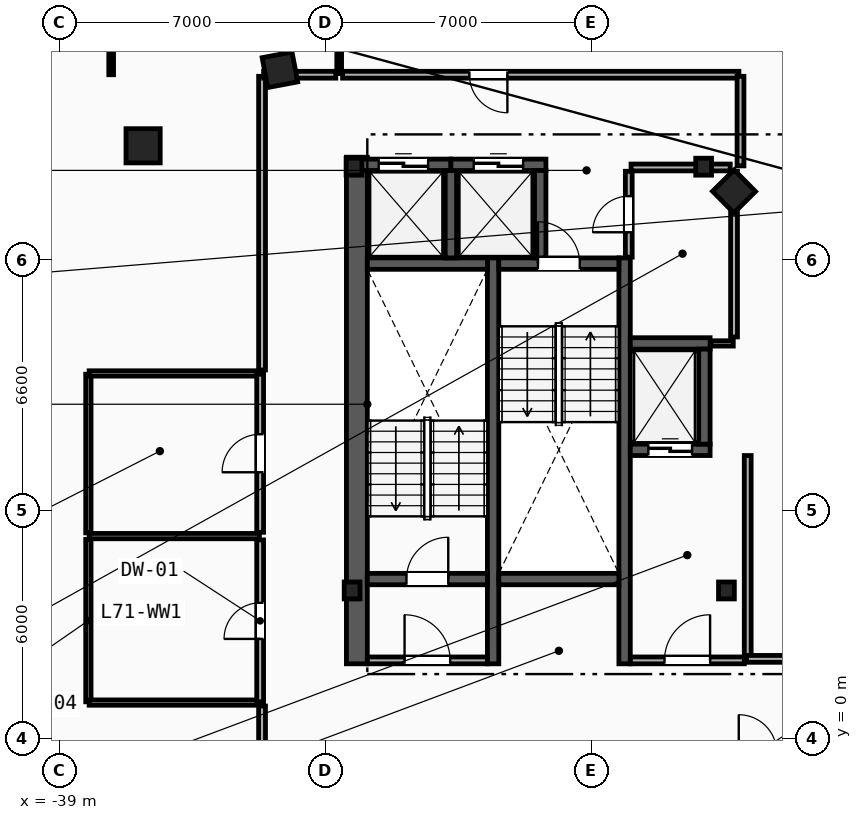
"""IFC4 building model, lengths in metres.
Left out: names, types, materials, properties, quantities, classifications, styles, units other than length and angle.
Written with IfcOpenShell. Run it as: python <this file> out.ifc"""

import sys

from ifc_helpers import new_model, si_unit, direction, frame, frame_2d, origin, origin_2d, place, context, subcontext, project, spatial, rectangle, i_section, extrude, element, fill, save


model = new_model("IFC4")
c1 = context("Model", 3, precision=1e-05, world=origin(), true_north=direction((0.0, 1.0)))
c2 = subcontext(c1, "Body", "Model", "MODEL_VIEW")
j1 = project(units=[si_unit("LENGTHUNIT", "METRE"), si_unit("PLANEANGLEUNIT", "RADIAN")], contexts=[c1])
p1 = place(None, origin())
s1 = spatial("IfcSite", under=j1, at=p1, CompositionType="ELEMENT")
p2 = place(p1, origin())
s2 = spatial("IfcBuilding", under=s1, at=p2, CompositionType="ELEMENT")
p3 = place(p2, frame((0.0, 0.0, 268.4)))
s3 = spatial("IfcBuildingStorey", under=s2, at=p3, CompositionType="ELEMENT", Elevation=268.4)
for number, where, z_axis, x_axis in (
    (1, (-31.3, 3.9, 0.0), (0.0, 0.0, 1.0), (1.0, 0.0, 0.0)),
    (2, (-21.45, 3.9, 0.0), (0.0, 0.0, 1.0), (1.0, 0.0, 0.0)),
    (3, (-22.05, 15.05, 0.0), (0.0, 0.0, 1.0), (1.0, 0.0, 0.0)),
    (4, (-31.25, 15.05, 0.0), (0.0, 0.0, 1.0), (1.0, 0.0, 0.0)),
):
    element("IfcColumn", number, at=place(p3, frame(where, z_axis=z_axis, x_axis=x_axis)), inside=s3, PredefinedType="COLUMN", context=c2, shape_type="SweptSolid", body=[
        extrude(i_section(OverallWidth=0.416, OverallDepth=0.446, WebThickness=0.039, FlangeThickness=0.063, FilletRadius=0.018, at=origin_2d()), origin(), (0.0, 0.0, 1.0), 3.6),
    ])
p4 = place(p3, frame((-36.8, 15.6, 0.0), z_axis=(0.0, 0.0, 1.0), x_axis=(1.0, 0.0, 0.0)))
e5 = element("IfcColumn", 5, at=p4, inside=s3, PredefinedType="COLUMN", context=c2, shape_type="SweptSolid", body=[
    extrude(rectangle(XDim=0.9, YDim=0.9, at=origin_2d()), origin(), (0.0, 0.0, 1.0), 3.6),
])
for number, where, z_axis, x_axis in (
    (6, (-21.25, 14.4, 0.0), (0.0, 0.0, 1.0), (-0.703, 0.711, 0.0)),
    (7, (-33.2, 17.6, 0.0), (0.0, 0.0, 1.0), (-0.983, -0.186, 0.0)),
):
    element("IfcColumn", number, at=place(p3, frame(where, z_axis=z_axis, x_axis=x_axis)), inside=s3, PredefinedType="COLUMN", context=c2, shape_type="SweptSolid", body=[
        extrude(rectangle(XDim=0.8, YDim=0.8, at=origin_2d()), origin(), (0.0, 0.0, 1.0), 3.6),
    ])
p5 = place(p3, frame((-31.175, 1.97, 0.0), z_axis=(0.0, 0.0, 1.0), x_axis=(0.0, 1.0, 0.0)))
e8 = element("IfcWall", 8, at=p5, inside=s3, PredefinedType="SHEAR", context=c2, shape_type="SweptSolid", body=[
    extrude(rectangle(XDim=13.33, YDim=0.55, at=frame_2d((6.665, 0.0))), origin(), (0.0, 0.0, 1.0), 3.34),
])
for number, where, z_axis, x_axis in (
    (9, (-27.59, 1.97, 0.0), (0.0, 0.0, 1.0), (0.0, 1.0, 0.0)),
    (10, (-24.13, 1.97, 0.0), (0.0, 0.0, 1.0), (0.0, 1.0, 0.0)),
):
    element("IfcWall", number, at=place(p3, frame(where, z_axis=z_axis, x_axis=x_axis)), inside=s3, PredefinedType="SHEAR", context=c2, shape_type="SweptSolid", body=[
        extrude(rectangle(XDim=10.68, YDim=0.3, at=frame_2d((5.34, 0.0))), origin(), (0.0, 0.0, 1.0), 3.34),
    ])
p6 = place(p3, frame((-30.9, 4.2, 0.0), z_axis=(0.0, 0.0, 1.0), x_axis=(1.0, 0.0, 0.0)))
e11 = element("IfcWall", 11, at=p6, inside=s3, PredefinedType="SHEAR", context=c2, shape_type="SweptSolid", body=[
    extrude(rectangle(XDim=3.16, YDim=0.3, at=frame_2d((1.58, 0.0))), origin(), (0.0, 0.0, 1.0), 3.34),
])
p7 = place(p6, frame((1.03, 0.0, 0.0)))
e12 = element("IfcOpeningElement", 12, at=p7, cuts=e11, PredefinedType="OPENING", context=c2, shape_type="SweptSolid", body=[
    extrude(rectangle(XDim=1.1, YDim=2.15, at=frame_2d((0.55, 1.075))), frame((0.0, 0.16, 0.0), z_axis=(0.0, -1.0, 0.0), x_axis=(1.0, 0.0, 0.0)), (0.0, 0.0, 1.0), 0.32),
])
p8 = place(p3, frame((-30.9, 12.5, 0.0), z_axis=(0.0, 0.0, 1.0), x_axis=(1.0, 0.0, 0.0)))
e13 = element("IfcWall", 13, at=p8, inside=s3, PredefinedType="SHEAR", context=c2, shape_type="SweptSolid", body=[
    extrude(rectangle(XDim=3.16, YDim=0.3, at=frame_2d((1.58, 0.0))), origin(), (0.0, 0.0, 1.0), 3.34),
])
p9 = place(p3, frame((-27.44, 12.5, 0.0), z_axis=(0.0, 0.0, 1.0), x_axis=(1.0, 0.0, 0.0)))
e14 = element("IfcWall", 14, at=p9, inside=s3, PredefinedType="SHEAR", context=c2, shape_type="SweptSolid", body=[
    extrude(rectangle(XDim=3.16, YDim=0.3, at=frame_2d((1.58, 0.0))), origin(), (0.0, 0.0, 1.0), 3.34),
])
p10 = place(p9, frame((1.03, 0.0, 0.0)))
e15 = element("IfcOpeningElement", 15, at=p10, cuts=e14, PredefinedType="OPENING", context=c2, shape_type="SweptSolid", body=[
    extrude(rectangle(XDim=1.1, YDim=2.15, at=frame_2d((0.55, 1.075))), frame((0.0, 0.16, 0.0), z_axis=(0.0, -1.0, 0.0), x_axis=(1.0, 0.0, 0.0)), (0.0, 0.0, 1.0), 0.32),
])
p11 = place(p3, frame((-27.44, 4.2, 0.0), z_axis=(0.0, 0.0, 1.0), x_axis=(1.0, 0.0, 0.0)))
e16 = element("IfcWall", 16, at=p11, inside=s3, PredefinedType="SHEAR", context=c2, shape_type="SweptSolid", body=[
    extrude(rectangle(XDim=3.16, YDim=0.3, at=frame_2d((1.58, 0.0))), origin(), (0.0, 0.0, 1.0), 3.34),
])
p12 = place(p3, frame((-20.89, 2.15, 0.0), z_axis=(0.0, 0.0, 1.0), x_axis=(0.0, 1.0, 0.0)))
e17 = element("IfcWall", 17, at=p12, inside=s3, PredefinedType="PARTITIONING", context=c2, shape_type="SweptSolid", body=[
    extrude(rectangle(XDim=5.3, YDim=0.18, at=frame_2d((2.65, 0.0))), origin(), (0.0, 0.0, 1.0), 3.34),
])
p13 = place(p3, frame((-23.98, 2.06, 0.0), z_axis=(0.0, 0.0, 1.0), x_axis=(1.0, 0.0, 0.0)))
e18 = element("IfcWall", 18, at=p13, inside=s3, PredefinedType="PARTITIONING", context=c2, shape_type="SweptSolid", body=[
    extrude(rectangle(XDim=3.0, YDim=0.18, at=frame_2d((1.5, 0.0))), origin(), (0.0, 0.0, 1.0), 3.34),
])
p14 = place(p13, frame((0.9, 0.0, 0.0)))
e19 = element("IfcOpeningElement", 19, at=p14, cuts=e18, PredefinedType="OPENING", context=c2, shape_type="SweptSolid", body=[
    extrude(rectangle(XDim=1.2, YDim=2.15, at=frame_2d((0.6, 1.075))), frame((0.0, 0.1, 0.0), z_axis=(0.0, -1.0, 0.0), x_axis=(1.0, 0.0, 0.0)), (0.0, 0.0, 1.0), 0.2),
])
p15 = place(p3, frame((-30.9, 2.06, 0.0), z_axis=(0.0, 0.0, 1.0), x_axis=(1.0, 0.0, 0.0)))
e20 = element("IfcWall", 20, at=p15, inside=s3, PredefinedType="PARTITIONING", context=c2, shape_type="SweptSolid", body=[
    extrude(rectangle(XDim=3.16, YDim=0.18, at=frame_2d((1.58, 0.0))), origin(), (0.0, 0.0, 1.0), 3.34),
])
p16 = place(p15, frame((0.98, 0.0, 0.0)))
e21 = element("IfcOpeningElement", 21, at=p16, cuts=e20, PredefinedType="OPENING", context=c2, shape_type="SweptSolid", body=[
    extrude(rectangle(XDim=1.2, YDim=2.15, at=frame_2d((0.6, 1.075))), frame((0.0, 0.1, 0.0), z_axis=(0.0, -1.0, 0.0), x_axis=(1.0, 0.0, 0.0)), (0.0, 0.0, 1.0), 0.2),
])
p17 = place(p3, frame((-23.98, 7.6, 0.0), z_axis=(0.0, 0.0, 1.0), x_axis=(1.0, 0.0, 0.0)))
e22 = element("IfcWall", 22, at=p17, inside=s3, PredefinedType="SHEAR", context=c2, shape_type="SweptSolid", body=[
    extrude(rectangle(XDim=2.1, YDim=0.3, at=frame_2d((1.05, 0.0))), origin(), (0.0, 0.0, 1.0), 3.34),
])
p18 = place(p17, frame((0.475, 0.0, 0.0)))
e23 = element("IfcOpeningElement", 23, at=p18, cuts=e22, PredefinedType="OPENING", context=c2, shape_type="SweptSolid", body=[
    extrude(rectangle(XDim=1.15, YDim=2.2, at=frame_2d((0.575, 1.1))), frame((0.0, 0.16, 0.0), z_axis=(0.0, -1.0, 0.0), x_axis=(1.0, 0.0, 0.0)), (0.0, 0.0, 1.0), 0.32),
])
p19 = place(p3, frame((-23.98, 10.4, 0.0), z_axis=(0.0, 0.0, 1.0), x_axis=(1.0, 0.0, 0.0)))
e24 = element("IfcWall", 24, at=p19, inside=s3, PredefinedType="SHEAR", context=c2, shape_type="SweptSolid", body=[
    extrude(rectangle(XDim=2.1, YDim=0.3, at=frame_2d((1.05, 0.0))), origin(), (0.0, 0.0, 1.0), 3.34),
])
p20 = place(p3, frame((-22.03, 7.75, 0.0), z_axis=(0.0, 0.0, 1.0), x_axis=(0.0, 1.0, 0.0)))
e25 = element("IfcWall", 25, at=p20, inside=s3, PredefinedType="SHEAR", context=c2, shape_type="SweptSolid", body=[
    extrude(rectangle(XDim=2.5, YDim=0.3, at=frame_2d((1.25, 0.0))), origin(), (0.0, 0.0, 1.0), 3.34),
])
p21 = place(p3, frame((-31.2, 15.1, 0.0), z_axis=(0.0, 0.0, 1.0), x_axis=(1.0, 0.0, 0.0)))
e26 = element("IfcWall", 26, at=p21, inside=s3, PredefinedType="SHEAR", context=c2, shape_type="SweptSolid", body=[
    extrude(rectangle(XDim=2.5, YDim=0.3, at=frame_2d((1.25, 0.0))), origin(), (0.0, 0.0, 1.0), 3.34),
])
p22 = place(p21, frame((0.6, 0.0, 0.0)))
e27 = element("IfcOpeningElement", 27, at=p22, cuts=e26, PredefinedType="OPENING", context=c2, shape_type="SweptSolid", body=[
    extrude(rectangle(XDim=1.3, YDim=2.2, at=frame_2d((0.65, 1.1))), frame((0.0, 0.16, 0.0), z_axis=(0.0, -1.0, 0.0), x_axis=(1.0, 0.0, 0.0)), (0.0, 0.0, 1.0), 0.32),
])
p23 = place(p3, frame((-28.7, 12.65, 0.0), z_axis=(0.0, 0.0, 1.0), x_axis=(0.0, 1.0, 0.0)))
e28 = element("IfcWall", 28, at=p23, inside=s3, PredefinedType="SHEAR", context=c2, shape_type="SweptSolid", body=[
    extrude(rectangle(XDim=2.3, YDim=0.3, at=frame_2d((1.15, 0.0))), origin(), (0.0, 0.0, 1.0), 3.34),
])
p24 = place(p3, frame((-28.7, 15.1, 0.0), z_axis=(0.0, 0.0, 1.0), x_axis=(1.0, 0.0, 0.0)))
e29 = element("IfcWall", 29, at=p24, inside=s3, PredefinedType="SHEAR", context=c2, shape_type="SweptSolid", body=[
    extrude(rectangle(XDim=2.5, YDim=0.3, at=frame_2d((1.25, 0.0))), origin(), (0.0, 0.0, 1.0), 3.34),
])
p25 = place(p24, frame((0.6, 0.0, 0.0)))
e30 = element("IfcOpeningElement", 30, at=p25, cuts=e29, PredefinedType="OPENING", context=c2, shape_type="SweptSolid", body=[
    extrude(rectangle(XDim=1.3, YDim=2.2, at=frame_2d((0.65, 1.1))), frame((0.0, 0.16, 0.0), z_axis=(0.0, -1.0, 0.0), x_axis=(1.0, 0.0, 0.0)), (0.0, 0.0, 1.0), 0.32),
])
p26 = place(p3, frame((-26.35, 12.65, 0.0), z_axis=(0.0, 0.0, 1.0), x_axis=(0.0, 1.0, 0.0)))
e31 = element("IfcWall", 31, at=p26, inside=s3, PredefinedType="SHEAR", context=c2, shape_type="SweptSolid", body=[
    extrude(rectangle(XDim=2.3, YDim=0.3, at=frame_2d((1.15, 0.0))), origin(), (0.0, 0.0, 1.0), 3.34),
])
p27 = place(p3, frame((-21.86, 10.4, 0.0), z_axis=(0.0, 0.0, 1.0), x_axis=(1.0, 0.0, 0.0)))
e32 = element("IfcWall", 32, at=p27, inside=s3, PredefinedType="PARTITIONING", context=c2, shape_type="SweptSolid", body=[
    extrude(rectangle(XDim=0.59, YDim=0.14, at=frame_2d((0.295, 0.0))), origin(), (0.0, 0.0, 1.0), 3.34),
])
p28 = place(p3, frame((-21.25, 10.57, 0.0), z_axis=(0.0, 0.0, 1.0), x_axis=(0.0, 1.0, 0.0)))
e33 = element("IfcWall", 33, at=p28, inside=s3, PredefinedType="PARTITIONING", context=c2, shape_type="SweptSolid", body=[
    extrude(rectangle(XDim=4.36, YDim=0.18, at=frame_2d((2.18, 0.0))), origin(), (0.0, 0.0, 1.0), 3.34),
])
p29 = place(p3, frame((-23.96, 15.03, 0.0), z_axis=(0.0, 0.0, 1.0), x_axis=(1.0, 0.0, 0.0)))
e34 = element("IfcWall", 34, at=p29, inside=s3, PredefinedType="PARTITIONING", context=c2, shape_type="SweptSolid", body=[
    extrude(rectangle(XDim=2.61, YDim=0.18, at=frame_2d((1.305, 0.0))), origin(), (0.0, 0.0, 1.0), 2.413),
])
p30 = place(p3, frame((-24.02, 12.67, 0.0), z_axis=(0.0, 0.0, 1.0), x_axis=(0.0, 1.0, 0.0)))
e35 = element("IfcWall", 35, at=p30, inside=s3, PredefinedType="PARTITIONING", context=c2, shape_type="SweptSolid", body=[
    extrude(rectangle(XDim=2.26, YDim=0.18, at=frame_2d((1.13, 0.0))), origin(), (0.0, 0.0, 1.0), 3.34),
])
p31 = place(p30, frame((0.655, 0.0, 0.0)))
e36 = element("IfcOpeningElement", 36, at=p31, cuts=e35, PredefinedType="OPENING", context=c2, shape_type="SweptSolid", body=[
    extrude(rectangle(XDim=0.95, YDim=2.1, at=frame_2d((0.475, 1.05))), frame((0.0, 0.1, 0.0), z_axis=(0.0, -1.0, 0.0), x_axis=(1.0, 0.0, 0.0)), (0.0, 0.0, 1.0), 0.2),
])
p32 = place(p3, frame((-38.24, 0.97, 0.0), z_axis=(0.0, 0.0, 1.0), x_axis=(0.0, 1.0, 0.0)))
e37 = element("IfcWall", 37, at=p32, inside=s3, PredefinedType="PARTITIONING", context=c2, shape_type="SweptSolid", body=[
    extrude(rectangle(XDim=4.275, YDim=0.14, at=frame_2d((2.138, 0.0))), origin(), (0.0, 0.0, 1.0), 3.34),
])
p33 = place(p3, frame((-38.24, 5.415, 0.0), z_axis=(0.0, 0.0, 1.0), x_axis=(0.0, 1.0, 0.0)))
e38 = element("IfcWall", 38, at=p33, inside=s3, PredefinedType="PARTITIONING", context=c2, shape_type="SweptSolid", body=[
    extrude(rectangle(XDim=4.175, YDim=0.14, at=frame_2d((2.087, 0.0))), origin(), (0.0, 0.0, 1.0), 3.34),
])
for number, where, z_axis, x_axis in (
    (39, (-38.22, 0.95, 0.0), (0.0, 0.0, 1.0), (1.0, 0.0, 0.0)),
    (40, (-38.22, 5.33, 0.0), (0.0, 0.0, 1.0), (1.0, 0.0, 0.0)),
    (41, (-38.22, 9.61, 0.0), (0.0, 0.0, 1.0), (1.0, 0.0, 0.0)),
):
    element("IfcWall", number, at=place(p3, frame(where, z_axis=z_axis, x_axis=x_axis)), inside=s3, PredefinedType="PARTITIONING", context=c2, shape_type="SweptSolid", body=[
        extrude(rectangle(XDim=4.48, YDim=0.14, at=frame_2d((2.24, 0.0))), origin(), (0.0, 0.0, 1.0), 3.34),
    ])
p34 = place(p3, frame((-33.72, 0.97, 0.0), z_axis=(0.0, 0.0, 1.0), x_axis=(0.0, 1.0, 0.0)))
e42 = element("IfcWall", 42, at=p34, inside=s3, PredefinedType="PARTITIONING", context=c2, shape_type="SweptSolid", body=[
    extrude(rectangle(XDim=4.26, YDim=0.18, at=frame_2d((2.13, 0.0))), origin(), (0.0, 0.0, 1.0), 3.34),
])
p35 = place(p34, frame((1.655, 0.0, 0.0)))
e43 = element("IfcOpeningElement", 43, at=p35, cuts=e42, PredefinedType="OPENING", context=c2, shape_type="SweptSolid", body=[
    extrude(rectangle(XDim=0.95, YDim=2.1, at=frame_2d((0.475, 1.05))), frame((0.0, 0.1, 0.0), z_axis=(0.0, -1.0, 0.0), x_axis=(1.0, 0.0, 0.0)), (0.0, 0.0, 1.0), 0.2),
])
p36 = place(p3, frame((-33.72, 5.43, 0.0), z_axis=(0.0, 0.0, 1.0), x_axis=(0.0, 1.0, 0.0)))
e44 = element("IfcWall", 44, at=p36, inside=s3, PredefinedType="PARTITIONING", context=c2, shape_type="SweptSolid", body=[
    extrude(rectangle(XDim=4.16, YDim=0.18, at=frame_2d((2.08, 0.0))), origin(), (0.0, 0.0, 1.0), 3.34),
])
p37 = place(p36, frame((1.58, 0.0, 0.0)))
e45 = element("IfcOpeningElement", 45, at=p37, cuts=e44, PredefinedType="OPENING", context=c2, shape_type="SweptSolid", body=[
    extrude(rectangle(XDim=1.0, YDim=2.15, at=frame_2d((0.5, 1.075))), frame((0.0, 0.1, 0.0), z_axis=(0.0, -1.0, 0.0), x_axis=(1.0, 0.0, 0.0)), (0.0, 0.0, 1.0), 0.2),
])
p38 = place(p3, frame((-37.64, 17.47, 0.0), z_axis=(0.0, 0.0, 1.0), x_axis=(0.0, 1.0, 0.0)))
e46 = element("IfcWall", 46, at=p38, inside=s3, PredefinedType="PARTITIONING", context=c2, shape_type="SweptSolid", body=[
    extrude(rectangle(XDim=6.961, YDim=0.125, at=frame_2d((3.48, 0.0))), origin(), (0.0, 0.0, 1.0), 3.34),
])
p39 = place(p3, frame((-31.64, 17.5, 0.0), z_axis=(0.0, 0.0, 1.0), x_axis=(0.0, 1.0, 0.0)))
e47 = element("IfcWall", 47, at=p39, inside=s3, PredefinedType="PARTITIONING", context=c2, shape_type="SweptSolid", body=[
    extrude(rectangle(XDim=7.69, YDim=0.125, at=frame_2d((3.845, 0.0))), origin(), (0.0, 0.0, 1.0), 3.34),
])
p40 = place(p3, frame((-33.67, 17.428, 0.0), z_axis=(0.0, 0.0, 1.0), x_axis=(0.0, -1.0, 0.0)))
e48 = element("IfcWall", 48, at=p40, inside=s3, PredefinedType="PARTITIONING", context=c2, shape_type="SweptSolid", body=[
    extrude(rectangle(XDim=7.727, YDim=0.18, at=frame_2d((3.864, 0.0))), origin(), (0.0, 0.0, 1.0), 3.34),
])
p41 = place(p3, frame((-31.73, 17.47, 0.0), z_axis=(0.0, 0.0, 1.0), x_axis=(-1.0, 0.0, 0.0)))
e49 = element("IfcWall", 49, at=p41, inside=s3, PredefinedType="PARTITIONING", context=c2, shape_type="SweptSolid", body=[
    extrude(rectangle(XDim=1.898, YDim=0.18, at=frame_2d((0.949, 0.0))), origin(), (0.0, 0.0, 1.0), 3.34),
])
p42 = place(p3, frame((-33.67, 0.859, 0.0), z_axis=(0.0, 0.0, 1.0), x_axis=(0.0, -1.0, 0.0)))
e50 = element("IfcWall", 50, at=p42, inside=s3, PredefinedType="PARTITIONING", context=c2, shape_type="SweptSolid", body=[
    extrude(rectangle(XDim=1.187, YDim=0.18, at=frame_2d((0.594, 0.0))), origin(), (0.0, 0.0, 1.0), 3.34),
])
p43 = place(p3, frame((-21.122, 17.47, 0.0), z_axis=(0.0, 0.0, 1.0), x_axis=(-1.0, 0.0, 0.0)))
e51 = element("IfcWall", 51, at=p43, inside=s3, PredefinedType="PARTITIONING", context=c2, shape_type="SweptSolid", body=[
    extrude(rectangle(XDim=10.428, YDim=0.18, at=frame_2d((5.214, 0.0))), origin(), (0.0, 0.0, 1.0), 3.34),
])
p44 = place(p43, frame((6.093, 0.0, 0.0)))
e52 = element("IfcOpeningElement", 52, at=p44, cuts=e51, PredefinedType="OPENING", context=c2, shape_type="SweptSolid", body=[
    extrude(rectangle(XDim=1.0, YDim=2.15, at=frame_2d((0.5, 1.075))), frame((0.0, 0.1, 0.0), z_axis=(0.0, -1.0, 0.0), x_axis=(1.0, 0.0, 0.0)), (0.0, 0.0, 1.0), 0.2),
])
p45 = place(p3, frame((-16.9, 2.1, 0.0), z_axis=(0.0, 0.0, 1.0), x_axis=(-1.0, 0.0, 0.0)))
e53 = element("IfcWall", 53, at=p45, inside=s3, PredefinedType="PARTITIONING", context=c2, shape_type="SweptSolid", body=[
    extrude(rectangle(XDim=4.02, YDim=0.18, at=frame_2d((2.01, 0.0))), origin(), (0.0, 0.0, 1.0), 3.34),
])
p46 = place(p3, frame((-21.08, 15.072, 0.0), z_axis=(0.0, 0.0, 1.0), x_axis=(0.0, 1.0, 0.0)))
e54 = element("IfcWall", 54, at=p46, inside=s3, PredefinedType="PARTITIONING", context=c2, shape_type="SweptSolid", body=[
    extrude(rectangle(XDim=2.357, YDim=0.18, at=frame_2d((1.178, 0.0))), origin(), (0.0, 0.0, 1.0), 3.34),
])
p47 = place(p7, origin())
e55 = element("IfcDoor", 55, at=p47, inside=s3, OperationType="SINGLE_SWING_RIGHT", PredefinedType="DOOR", context=c2, shape_type="SweptSolid", body=[
    extrude(rectangle(XDim=1.1, YDim=2.15, at=frame_2d((0.55, 1.075))), frame((0.0, 0.025, 0.0), z_axis=(0.0, -1.0, 0.0), x_axis=(1.0, 0.0, 0.0)), (0.0, 0.0, 1.0), 0.05),
])
fill(e12, e55)
p48 = place(p10, origin())
e56 = element("IfcDoor", 56, at=p48, inside=s3, OperationType="SINGLE_SWING_LEFT", PredefinedType="DOOR", context=c2, shape_type="SweptSolid", body=[
    extrude(rectangle(XDim=1.1, YDim=2.15, at=frame_2d((0.55, 1.075))), frame((0.0, 0.025, 0.0), z_axis=(0.0, -1.0, 0.0), x_axis=(1.0, 0.0, 0.0)), (0.0, 0.0, 1.0), 0.05),
])
fill(e15, e56)
p49 = place(p14, origin())
e57 = element("IfcDoor", 57, at=p49, inside=s3, OperationType="SINGLE_SWING_RIGHT", PredefinedType="DOOR", context=c2, shape_type="SweptSolid", body=[
    extrude(rectangle(XDim=1.2, YDim=2.15, at=frame_2d((0.6, 1.075))), frame((0.0, 0.025, 0.0), z_axis=(0.0, -1.0, 0.0), x_axis=(1.0, 0.0, 0.0)), (0.0, 0.0, 1.0), 0.05),
])
fill(e19, e57)
p50 = place(p16, origin())
e58 = element("IfcDoor", 58, at=p50, inside=s3, OperationType="SINGLE_SWING_LEFT", PredefinedType="DOOR", context=c2, shape_type="SweptSolid", body=[
    extrude(rectangle(XDim=1.2, YDim=2.15, at=frame_2d((0.6, 1.075))), frame((0.0, 0.025, 0.0), z_axis=(0.0, -1.0, 0.0), x_axis=(1.0, 0.0, 0.0)), (0.0, 0.0, 1.0), 0.05),
])
fill(e21, e58)
p51 = place(p18, origin())
e59 = element("IfcDoor", 59, at=p51, inside=s3, OperationType="SLIDING_TO_LEFT", PredefinedType="TRAPDOOR", context=c2, shape_type="SweptSolid", body=[
    extrude(rectangle(XDim=1.15, YDim=2.2, at=frame_2d((0.575, 1.1))), frame((0.0, 0.025, 0.0), z_axis=(0.0, -1.0, 0.0), x_axis=(1.0, 0.0, 0.0)), (0.0, 0.0, 1.0), 0.05),
])
fill(e23, e59)
p52 = place(p22, origin())
e60 = element("IfcDoor", 60, at=p52, inside=s3, OperationType="SLIDING_TO_LEFT", PredefinedType="TRAPDOOR", context=c2, shape_type="SweptSolid", body=[
    extrude(rectangle(XDim=1.3, YDim=2.2, at=frame_2d((0.65, 1.1))), frame((0.0, 0.025, 0.0), z_axis=(0.0, -1.0, 0.0), x_axis=(1.0, 0.0, 0.0)), (0.0, 0.0, 1.0), 0.05),
])
fill(e27, e60)
p53 = place(p25, origin())
e61 = element("IfcDoor", 61, at=p53, inside=s3, OperationType="SLIDING_TO_LEFT", PredefinedType="TRAPDOOR", context=c2, shape_type="SweptSolid", body=[
    extrude(rectangle(XDim=1.3, YDim=2.2, at=frame_2d((0.65, 1.1))), frame((0.0, 0.025, 0.0), z_axis=(0.0, -1.0, 0.0), x_axis=(1.0, 0.0, 0.0)), (0.0, 0.0, 1.0), 0.05),
])
fill(e30, e61)
p54 = place(p44, origin())
e62 = element("IfcDoor", 62, at=p54, inside=s3, OperationType="SINGLE_SWING_LEFT", PredefinedType="DOOR", context=c2, shape_type="SweptSolid", body=[
    extrude(rectangle(XDim=1.0, YDim=2.15, at=frame_2d((0.5, 1.075))), frame((0.0, 0.025, 0.0), z_axis=(0.0, -1.0, 0.0), x_axis=(1.0, 0.0, 0.0)), (0.0, 0.0, 1.0), 0.05),
])
fill(e52, e62)
p55 = place(p35, origin())
e63 = element("IfcDoor", 63, at=p55, inside=s3, OperationType="SINGLE_SWING_LEFT", PredefinedType="DOOR", context=c2, shape_type="SweptSolid", body=[
    extrude(rectangle(XDim=0.95, YDim=2.1, at=frame_2d((0.475, 1.05))), frame((0.0, 0.025, 0.0), z_axis=(0.0, -1.0, 0.0), x_axis=(1.0, 0.0, 0.0)), (0.0, 0.0, 1.0), 0.05),
])
fill(e43, e63)
p56 = place(p37, origin())
e64 = element("IfcDoor", 64, at=p56, inside=s3, OperationType="SINGLE_SWING_LEFT", PredefinedType="DOOR", context=c2, shape_type="SweptSolid", body=[
    extrude(rectangle(XDim=1.0, YDim=2.15, at=frame_2d((0.5, 1.075))), frame((0.0, 0.025, 0.0), z_axis=(0.0, -1.0, 0.0), x_axis=(1.0, 0.0, 0.0)), (0.0, 0.0, 1.0), 0.05),
])
fill(e45, e64)
p57 = place(p31, origin())
e65 = element("IfcDoor", 65, at=p57, inside=s3, OperationType="SINGLE_SWING_LEFT", PredefinedType="DOOR", context=c2, shape_type="SweptSolid", body=[
    extrude(rectangle(XDim=0.95, YDim=2.1, at=frame_2d((0.475, 1.05))), frame((0.0, 0.025, 0.0), z_axis=(0.0, -1.0, 0.0), x_axis=(1.0, 0.0, 0.0)), (0.0, 0.0, 1.0), 0.05),
])
fill(e36, e65)
save(model, sys.argv[1])
